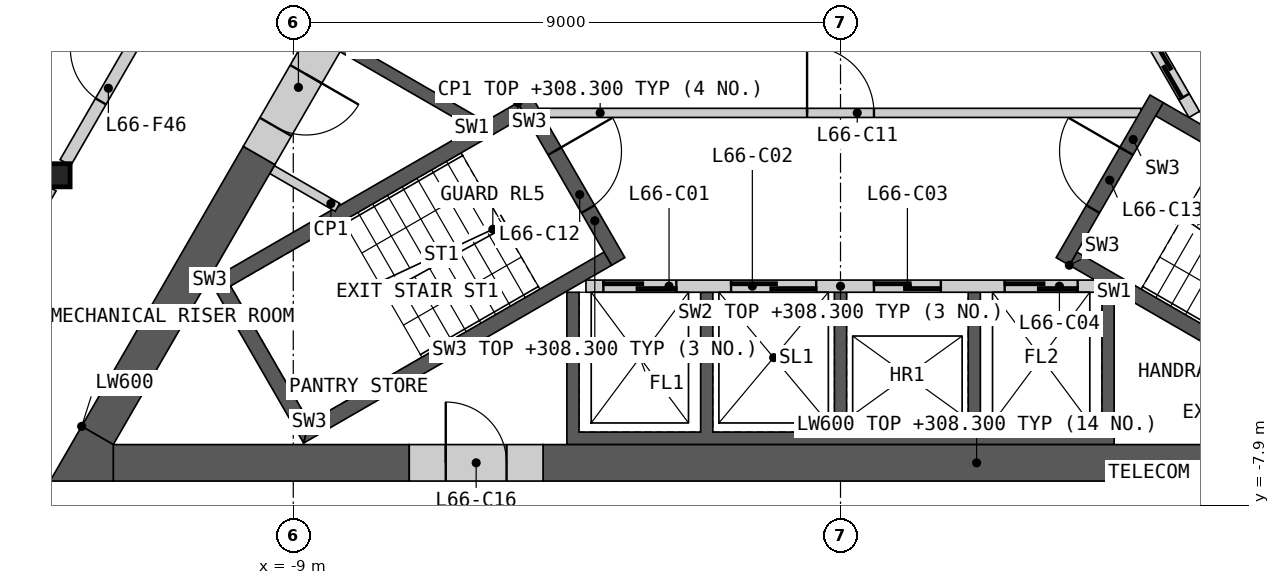
"""IFC4 building model, lengths in metres.
Left out: names, types, materials, properties, quantities, classifications, styles, units other than length and angle.
Written with IfcOpenShell. Run it as: python <this file> out.ifc"""

import sys

from ifc_helpers import new_model, si_unit, direction, frame, frame_2d, origin, origin_2d, place, context, subcontext, project, spatial, polyline, rectangle, i_section, outline, extrude, element, fill, save


model = new_model("IFC4")
c1 = context("Model", 3, precision=1e-05, world=origin(), true_north=direction((0.0, 1.0)))
c2 = subcontext(c1, "Body", "Model", "MODEL_VIEW")
j1 = project(units=[si_unit("LENGTHUNIT", "METRE"), si_unit("PLANEANGLEUNIT", "RADIAN")], contexts=[c1])
p1 = place(None, origin())
s1 = spatial("IfcSite", under=j1, at=p1, CompositionType="ELEMENT")
p2 = place(p1, origin())
s2 = spatial("IfcBuilding", under=s1, at=p2, CompositionType="ELEMENT")
p3 = place(p2, frame((0.0, 0.0, 305.2)))
s3 = spatial("IfcBuildingStorey", under=s2, at=p3, CompositionType="ELEMENT", Elevation=305.2)
p4 = place(p3, frame((-12.868, -2.476, 0.0), z_axis=(0.0, 0.0, 1.0), x_axis=(1.0, 0.0, 0.0)))
e1 = element("IfcColumn", 1, at=p4, inside=s3, PredefinedType="COLUMN", context=c2, shape_type="SweptSolid", body=[
    extrude(i_section(OverallWidth=0.396, OverallDepth=0.381, WebThickness=0.019, FlangeThickness=0.03, at=origin_2d()), origin(), (0.0, 0.0, 1.0), 3.4),
])
p5 = place(p3, origin())
e2 = element("IfcWall", 2, at=p5, inside=s3, PredefinedType="SHEAR", context=c2, shape_type="SweptSolid", body=[
    extrude(outline(polyline([(4.5, -4.4), (4.5, -6.906), (-4.5, -6.906), (-4.5, -4.4), (-4.3, -4.4), (-4.3, -6.7), (-2.3, -6.7), (-2.3, -4.4), (-2.1, -4.4), (-2.1, -6.7), (-0.1, -6.7), (-0.1, -4.4), (0.1, -4.4), (0.1, -6.7), (2.1, -6.7), (2.1, -4.4), (2.3, -4.4), (2.3, -6.7), (4.3, -6.7), (4.3, -4.4), (4.5, -4.4)])), origin(), (0.0, 0.0, 1.0), 3.1),
])
p6 = place(p3, frame((-4.187, -4.3, 0.0), z_axis=(0.0, 0.0, 1.0), x_axis=(1.0, 0.0, 0.0)))
e3 = element("IfcWall", 3, at=p6, inside=s3, PredefinedType="SOLIDWALL", context=c2, shape_type="SweptSolid", body=[
    extrude(rectangle(XDim=8.373, YDim=0.2, at=frame_2d((4.187, 0.0))), origin(), (0.0, 0.0, 1.0), 3.1),
])
p7 = place(p6, frame((0.287, 0.0, 0.0)))
e4 = element("IfcOpeningElement", 4, at=p7, cuts=e3, PredefinedType="OPENING", context=c2, shape_type="SweptSolid", body=[
    extrude(rectangle(XDim=1.2, YDim=2.1, at=frame_2d((0.6, 1.05))), frame((0.0, 0.11, 0.0), z_axis=(0.0, -1.0, 0.0), x_axis=(1.0, 0.0, 0.0)), (0.0, 0.0, 1.0), 0.22),
])
p8 = place(p6, frame((2.387, 0.0, 0.0)))
e5 = element("IfcOpeningElement", 5, at=p8, cuts=e3, PredefinedType="OPENING", context=c2, shape_type="SweptSolid", body=[
    extrude(rectangle(XDim=1.4, YDim=2.1, at=frame_2d((0.7, 1.05))), frame((0.0, 0.11, 0.0), z_axis=(0.0, -1.0, 0.0), x_axis=(1.0, 0.0, 0.0)), (0.0, 0.0, 1.0), 0.22),
])
p9 = place(p6, frame((4.737, 0.0, 0.0)))
e6 = element("IfcOpeningElement", 6, at=p9, cuts=e3, PredefinedType="OPENING", context=c2, shape_type="SweptSolid", body=[
    extrude(rectangle(XDim=1.1, YDim=2.1, at=frame_2d((0.55, 1.05))), frame((0.0, 0.11, 0.0), z_axis=(0.0, -1.0, 0.0), x_axis=(1.0, 0.0, 0.0)), (0.0, 0.0, 1.0), 0.22),
])
p10 = place(p6, frame((6.887, 0.0, 0.0)))
e7 = element("IfcOpeningElement", 7, at=p10, cuts=e3, PredefinedType="OPENING", context=c2, shape_type="SweptSolid", body=[
    extrude(rectangle(XDim=1.2, YDim=2.1, at=frame_2d((0.6, 1.05))), frame((0.0, 0.11, 0.0), z_axis=(0.0, -1.0, 0.0), x_axis=(1.0, 0.0, 0.0)), (0.0, 0.0, 1.0), 0.22),
])
p11 = place(p3, origin())
e8 = element("IfcWall", 8, at=p11, inside=s3, PredefinedType="SHEAR", context=c2, shape_type="SweptSolid", body=[
    extrude(outline(polyline([(1.561, 6.097), (3.731, 7.35), (8.231, -0.444), (6.061, -1.697), (5.96, -1.524), (7.952, -0.374), (6.952, 1.358), (4.96, 0.208), (4.861, 0.381), (6.852, 1.531), (5.852, 3.263), (3.861, 2.113), (3.76, 2.287), (5.752, 3.437), (4.752, 5.169), (2.76, 4.019), (2.66, 4.192), (4.652, 5.342), (3.652, 7.074), (1.66, 5.924), (1.561, 6.097)])), origin(), (0.0, 0.0, 1.0), 3.1),
])
p12 = place(p3, frame((5.817, -1.476, 0.0), z_axis=(0.0, 0.0, 1.0), x_axis=(-0.500002616675, 0.866023893041, 0.0)))
e9 = element("IfcWall", 9, at=p12, inside=s3, PredefinedType="SOLIDWALL", context=c2, shape_type="SweptSolid", body=[
    extrude(rectangle(XDim=8.373, YDim=0.2, at=frame_2d((4.187, 0.0))), origin(), (0.0, 0.0, 1.0), 3.1),
])
p13 = place(p12, frame((0.337, 0.0, 0.0)))
e10 = element("IfcOpeningElement", 10, at=p13, cuts=e9, PredefinedType="OPENING", context=c2, shape_type="SweptSolid", body=[
    extrude(rectangle(XDim=1.1, YDim=2.1, at=frame_2d((0.55, 1.05))), frame((0.0, 0.11, 0.0), z_axis=(0.0, -1.0, 0.0), x_axis=(1.0, 0.0, 0.0)), (0.0, 0.0, 1.0), 0.22),
])
p14 = place(p12, frame((2.537, 0.0, 0.0)))
e11 = element("IfcOpeningElement", 11, at=p14, cuts=e9, PredefinedType="OPENING", context=c2, shape_type="SweptSolid", body=[
    extrude(rectangle(XDim=1.1, YDim=2.1, at=frame_2d((0.55, 1.05))), frame((0.0, 0.11, 0.0), z_axis=(0.0, -1.0, 0.0), x_axis=(1.0, 0.0, 0.0)), (0.0, 0.0, 1.0), 0.22),
])
p15 = place(p12, frame((4.737, 0.0, 0.0)))
e12 = element("IfcOpeningElement", 12, at=p15, cuts=e9, PredefinedType="OPENING", context=c2, shape_type="SweptSolid", body=[
    extrude(rectangle(XDim=1.1, YDim=2.1, at=frame_2d((0.55, 1.05))), frame((0.0, 0.11, 0.0), z_axis=(0.0, -1.0, 0.0), x_axis=(1.0, 0.0, 0.0)), (0.0, 0.0, 1.0), 0.22),
])
p16 = place(p12, frame((7.037, 0.0, 0.0)))
e13 = element("IfcOpeningElement", 13, at=p16, cuts=e9, PredefinedType="OPENING", context=c2, shape_type="SweptSolid", body=[
    extrude(rectangle(XDim=0.9, YDim=2.1, at=frame_2d((0.45, 1.05))), frame((0.0, 0.11, 0.0), z_axis=(0.0, -1.0, 0.0), x_axis=(1.0, 0.0, 0.0)), (0.0, 0.0, 1.0), 0.22),
])
p17 = place(p3, origin())
e14 = element("IfcWall", 14, at=p17, inside=s3, PredefinedType="SHEAR", context=c2, shape_type="SweptSolid", body=[
    extrude(outline(polyline([(-6.061, -1.697), (-8.231, -0.444), (-8.131, -0.271), (-5.96, -1.524), (-6.061, -1.697)])), origin(), (0.0, 0.0, 1.0), 3.1),
])
p18 = place(p3, frame((-4.941, -1.45, 0.0), z_axis=(0.0, 0.0, 1.0), x_axis=(1.0, 0.0, 0.0)))
e15 = element("IfcWall", 15, at=p18, inside=s3, PredefinedType="PARTITIONING", context=c2, shape_type="SweptSolid", body=[
    extrude(rectangle(XDim=9.882, YDim=0.15, at=frame_2d((4.941, 0.0))), origin(), (0.0, 0.0, 1.0), 3.1),
])
p19 = place(p18, frame((4.391, 0.0, 0.0)))
e16 = element("IfcOpeningElement", 16, at=p19, cuts=e15, PredefinedType="OPENING", context=c2, shape_type="SweptSolid", body=[
    extrude(rectangle(XDim=1.1, YDim=2.1, at=frame_2d((0.55, 1.05))), frame((0.0, 0.085, 0.0), z_axis=(0.0, -1.0, 0.0), x_axis=(1.0, 0.0, 0.0)), (0.0, 0.0, 1.0), 0.17),
])
p20 = place(p3, origin())
e17 = element("IfcWall", 17, at=p20, inside=s3, PredefinedType="SHEAR", context=c2, shape_type="SweptSolid", body=[
    extrude(outline(polyline([(-5.307, -1.281), (-10.374, -4.206), (-10.032, -4.298), (-5.182, -1.498), (-5.307, -1.281)])), origin(), (0.0, 0.0, 1.0), 3.1),
])
p21 = place(p3, origin())
e18 = element("IfcWall", 18, at=p21, inside=s3, PredefinedType="SHEAR", context=c2, shape_type="SweptSolid", body=[
    extrude(outline(polyline([(-10.374, -4.206), (-8.83, -6.881), (-8.738, -6.539), (-10.032, -4.298), (-10.374, -4.206)])), origin(), (0.0, 0.0, 1.0), 3.1),
])
p22 = place(p3, origin())
e19 = element("IfcWall", 19, at=p22, inside=s3, PredefinedType="SHEAR", context=c2, shape_type="SweptSolid", body=[
    extrude(outline(polyline([(-8.738, -6.539), (-8.83, -6.881), (-3.763, -3.956), (-3.888, -3.739), (-8.738, -6.539)])), origin(), (0.0, 0.0, 1.0), 3.1),
])
p23 = place(p3, frame((-5.199, -1.219, 0.0), z_axis=(0.0, 0.0, 1.0), x_axis=(0.499982516597, -0.866035497597, 0.0)))
e20 = element("IfcWall", 20, at=p23, inside=s3, PredefinedType="SHEAR", context=c2, shape_type="SweptSolid", body=[
    extrude(rectangle(XDim=3.088, YDim=0.25, at=frame_2d((1.544, 0.0))), origin(), (0.0, 0.0, 1.0), 3.1),
])
p24 = place(p23, frame((0.994, 0.0, 0.0)))
e21 = element("IfcOpeningElement", 21, at=p24, cuts=e20, PredefinedType="OPENING", context=c2, shape_type="SweptSolid", body=[
    extrude(rectangle(XDim=1.1, YDim=2.1, at=frame_2d((0.55, 1.05))), frame((0.0, 0.135, 0.0), z_axis=(0.0, -1.0, 0.0), x_axis=(1.0, 0.0, 0.0)), (0.0, 0.0, 1.0), 0.27),
])
p25 = place(p3, origin())
e22 = element("IfcWall", 22, at=p25, inside=s3, PredefinedType="SHEAR", context=c2, shape_type="SweptSolid", body=[
    extrude(outline(polyline([(3.763, -3.956), (8.83, -6.881), (8.738, -6.539), (3.888, -3.739), (3.763, -3.956)])), origin(), (0.0, 0.0, 1.0), 3.1),
])
p26 = place(p3, origin())
e23 = element("IfcWall", 23, at=p26, inside=s3, PredefinedType="SHEAR", context=c2, shape_type="SweptSolid", body=[
    extrude(outline(polyline([(10.032, -4.298), (10.374, -4.206), (5.307, -1.281), (5.182, -1.498), (10.032, -4.298)])), origin(), (0.0, 0.0, 1.0), 3.1),
])
p27 = place(p3, frame((3.655, -3.893, 0.0), z_axis=(0.0, 0.0, 1.0), x_axis=(0.499982516597, 0.866035497597, 0.0)))
e24 = element("IfcWall", 24, at=p27, inside=s3, PredefinedType="SHEAR", context=c2, shape_type="SweptSolid", body=[
    extrude(rectangle(XDim=3.088, YDim=0.25, at=frame_2d((1.544, 0.0))), origin(), (0.0, 0.0, 1.0), 3.1),
])
p28 = place(p27, frame((0.994, 0.0, 0.0)))
e25 = element("IfcOpeningElement", 25, at=p28, cuts=e24, PredefinedType="OPENING", context=c2, shape_type="SweptSolid", body=[
    extrude(rectangle(XDim=1.1, YDim=2.1, at=frame_2d((0.55, 1.05))), frame((0.0, 0.135, 0.0), z_axis=(0.0, -1.0, 0.0), x_axis=(1.0, 0.0, 0.0)), (0.0, 0.0, 1.0), 0.27),
])
p29 = place(p3, frame((-9.35, -2.383, 0.0), z_axis=(0.0, 0.0, 1.0), x_axis=(0.866057962423, -0.499943602543, 0.0)))
e26 = element("IfcWall", 26, at=p29, inside=s3, PredefinedType="PARTITIONING", context=c2, shape_type="SweptSolid", body=[
    extrude(rectangle(XDim=1.242, YDim=0.15, at=frame_2d((0.621, 0.0))), origin(), (0.0, 0.0, 1.0), 3.1),
])
p30 = place(p3, frame((-4.892, -7.206, 0.0), z_axis=(0.0, 0.0, 1.0), x_axis=(1.0, 0.0, 0.0)))
e27 = element("IfcWall", 27, at=p30, inside=s3, PredefinedType="SHEAR", context=c2, shape_type="SweptSolid", body=[
    extrude(rectangle(XDim=14.261, YDim=0.6, at=frame_2d((7.13, 0.0))), origin(), (0.0, 0.0, 1.0), 3.1),
])
p31 = place(p3, frame((-11.961, -7.206, 0.0), z_axis=(0.0, 0.0, 1.0), x_axis=(1.0, 0.0, 0.0)))
e28 = element("IfcWall", 28, at=p31, inside=s3, PredefinedType="SHEAR", context=c2, shape_type="SweptSolid", body=[
    extrude(rectangle(XDim=4.868, YDim=0.6, at=frame_2d((2.434, 0.0))), origin(), (0.0, 0.0, 1.0), 3.1),
])
p32 = place(p3, frame((8.841, -0.902, 0.0), z_axis=(0.0, 0.0, 1.0), x_axis=(-0.499995618375, 0.866027933502, 0.0)))
e29 = element("IfcWall", 29, at=p32, inside=s3, PredefinedType="SHEAR", context=c2, shape_type="SweptSolid", body=[
    extrude(rectangle(XDim=14.571, YDim=0.6, at=frame_2d((7.285, 0.0))), origin(), (0.0, 0.0, 1.0), 3.1),
])
p33 = place(p3, frame((-9.562, -2.15, 0.0), z_axis=(0.0, 0.0, 1.0), x_axis=(-0.500015214976, -0.866016619236, 0.0)))
e30 = element("IfcWall", 30, at=p33, inside=s3, PredefinedType="SHEAR", context=c2, shape_type="SweptSolid", body=[
    extrude(rectangle(XDim=5.318, YDim=0.6, at=frame_2d((2.659, 0.0))), origin(), (0.0, 0.0, 1.0), 3.1),
])
p34 = place(p3, origin())
e31 = element("IfcWall", 31, at=p34, inside=s3, PredefinedType="SHEAR", context=c2, shape_type="SweptSolid", body=[
    extrude(outline(polyline([(-12.48, -6.606), (-11.961, -6.906), (-11.961, -7.506), (-13.0, -7.506), (-12.48, -6.606)])), origin(), (0.0, 0.0, 1.0), 3.1),
])
p35 = place(p3, frame((-7.092, -7.206, 0.0), z_axis=(0.0, 0.0, 1.0), x_axis=(1.0, 0.0, 0.0)))
e32 = element("IfcWall", 32, at=p35, inside=s3, PredefinedType="SHEAR", context=c2, shape_type="SweptSolid", body=[
    extrude(rectangle(XDim=2.2, YDim=0.6, at=frame_2d((1.1, 0.0))), origin(), (0.0, 0.0, 1.0), 3.1),
])
p36 = place(p35, frame((0.6, 0.0, 0.0)))
e33 = element("IfcOpeningElement", 33, at=p36, cuts=e32, PredefinedType="OPENING", context=c2, shape_type="SweptSolid", body=[
    extrude(rectangle(XDim=1.0, YDim=2.1, at=frame_2d((0.5, 1.05))), frame((0.0, 0.31, 0.0), z_axis=(0.0, -1.0, 0.0), x_axis=(1.0, 0.0, 0.0)), (0.0, 0.0, 1.0), 0.62),
])
p37 = place(p3, frame((-8.44, -0.208, 0.0), z_axis=(0.0, 0.0, 1.0), x_axis=(-0.500001951578, -0.866024277037, 0.0)))
e34 = element("IfcWall", 34, at=p37, inside=s3, PredefinedType="SHEAR", context=c2, shape_type="SweptSolid", body=[
    extrude(rectangle(XDim=2.243, YDim=0.6, at=frame_2d((1.122, 0.0))), origin(), (0.0, 0.0, 1.0), 3.1),
])
p38 = place(p37, frame((0.7, 0.0, 0.0)))
e35 = element("IfcOpeningElement", 35, at=p38, cuts=e34, PredefinedType="OPENING", context=c2, shape_type="SweptSolid", body=[
    extrude(rectangle(XDim=1.0, YDim=2.1, at=frame_2d((0.5, 1.05))), frame((0.0, 0.31, 0.0), z_axis=(0.0, -1.0, 0.0), x_axis=(1.0, 0.0, 0.0)), (0.0, 0.0, 1.0), 0.62),
])
p39 = place(p3, frame((-12.748, -2.269, 0.0), z_axis=(0.0, 0.0, 1.0), x_axis=(0.499984266882, 0.866034487114, 0.0)))
e36 = element("IfcWall", 36, at=p39, inside=s3, PredefinedType="PARTITIONING", context=c2, shape_type="SweptSolid", body=[
    extrude(rectangle(XDim=8.099, YDim=0.2, at=frame_2d((4.049, 0.0))), origin(), (0.0, 0.0, 1.0), 3.1),
])
p40 = place(p39, frame((1.164, 0.0, 0.0)))
e37 = element("IfcOpeningElement", 37, at=p40, cuts=e36, PredefinedType="OPENING", context=c2, shape_type="SweptSolid", body=[
    extrude(rectangle(XDim=1.0, YDim=2.1, at=frame_2d((0.5, 1.05))), frame((0.0, 0.11, 0.0), z_axis=(0.0, -1.0, 0.0), x_axis=(1.0, 0.0, 0.0)), (0.0, 0.0, 1.0), 0.22),
])
p41 = place(p3, frame((-15.131, -6.397, 0.0), z_axis=(0.0, 0.0, 1.0), x_axis=(0.500003406062, 0.866023437285, 0.0)))
e38 = element("IfcWall", 38, at=p41, inside=s3, PredefinedType="PARTITIONING", context=c2, shape_type="SweptSolid", body=[
    extrude(rectangle(XDim=4.288, YDim=0.2, at=frame_2d((2.144, 0.0))), origin(), (0.0, 0.0, 1.0), 3.1),
])
p42 = place(p7, origin())
e39 = element("IfcDoor", 39, at=p42, inside=s3, OperationType="SLIDING_TO_LEFT", PredefinedType="DOOR", context=c2, shape_type="SweptSolid", body=[
    extrude(rectangle(XDim=1.2, YDim=2.1, at=frame_2d((0.6, 1.05))), frame((0.0, 0.025, 0.0), z_axis=(0.0, -1.0, 0.0), x_axis=(1.0, 0.0, 0.0)), (0.0, 0.0, 1.0), 0.05),
])
fill(e4, e39)
p43 = place(p8, origin())
e40 = element("IfcDoor", 40, at=p43, inside=s3, OperationType="SLIDING_TO_LEFT", PredefinedType="DOOR", context=c2, shape_type="SweptSolid", body=[
    extrude(rectangle(XDim=1.4, YDim=2.1, at=frame_2d((0.7, 1.05))), frame((0.0, 0.025, 0.0), z_axis=(0.0, -1.0, 0.0), x_axis=(1.0, 0.0, 0.0)), (0.0, 0.0, 1.0), 0.05),
])
fill(e5, e40)
p44 = place(p9, origin())
e41 = element("IfcDoor", 41, at=p44, inside=s3, OperationType="SLIDING_TO_LEFT", PredefinedType="DOOR", context=c2, shape_type="SweptSolid", body=[
    extrude(rectangle(XDim=1.1, YDim=2.1, at=frame_2d((0.55, 1.05))), frame((0.0, 0.025, 0.0), z_axis=(0.0, -1.0, 0.0), x_axis=(1.0, 0.0, 0.0)), (0.0, 0.0, 1.0), 0.05),
])
fill(e6, e41)
p45 = place(p10, origin())
e42 = element("IfcDoor", 42, at=p45, inside=s3, OperationType="SLIDING_TO_LEFT", PredefinedType="DOOR", context=c2, shape_type="SweptSolid", body=[
    extrude(rectangle(XDim=1.2, YDim=2.1, at=frame_2d((0.6, 1.05))), frame((0.0, 0.025, 0.0), z_axis=(0.0, -1.0, 0.0), x_axis=(1.0, 0.0, 0.0)), (0.0, 0.0, 1.0), 0.05),
])
fill(e7, e42)
p46 = place(p13, origin())
e43 = element("IfcDoor", 43, at=p46, inside=s3, OperationType="SLIDING_TO_LEFT", PredefinedType="DOOR", context=c2, shape_type="SweptSolid", body=[
    extrude(rectangle(XDim=1.1, YDim=2.1, at=frame_2d((0.55, 1.05))), frame((0.0, 0.025, 0.0), z_axis=(0.0, -1.0, 0.0), x_axis=(1.0, 0.0, 0.0)), (0.0, 0.0, 1.0), 0.05),
])
fill(e10, e43)
p47 = place(p19, origin())
e44 = element("IfcDoor", 44, at=p47, inside=s3, OperationType="SINGLE_SWING_LEFT", PredefinedType="DOOR", context=c2, shape_type="SweptSolid", body=[
    extrude(rectangle(XDim=1.1, YDim=2.1, at=frame_2d((0.55, 1.05))), frame((0.0, 0.025, 0.0), z_axis=(0.0, -1.0, 0.0), x_axis=(1.0, 0.0, 0.0)), (0.0, 0.0, 1.0), 0.05),
])
fill(e16, e44)
p48 = place(p24, origin())
e45 = element("IfcDoor", 45, at=p48, inside=s3, OperationType="SINGLE_SWING_LEFT", PredefinedType="DOOR", context=c2, shape_type="SweptSolid", body=[
    extrude(rectangle(XDim=1.1, YDim=2.1, at=frame_2d((0.55, 1.05))), frame((0.0, 0.025, 0.0), z_axis=(0.0, -1.0, 0.0), x_axis=(1.0, 0.0, 0.0)), (0.0, 0.0, 1.0), 0.05),
])
fill(e21, e45)
p49 = place(p28, origin())
e46 = element("IfcDoor", 46, at=p49, inside=s3, OperationType="SINGLE_SWING_RIGHT", PredefinedType="DOOR", context=c2, shape_type="SweptSolid", body=[
    extrude(rectangle(XDim=1.1, YDim=2.1, at=frame_2d((0.55, 1.05))), frame((0.0, 0.025, 0.0), z_axis=(0.0, -1.0, 0.0), x_axis=(1.0, 0.0, 0.0)), (0.0, 0.0, 1.0), 0.05),
])
fill(e25, e46)
p50 = place(p36, origin())
e47 = element("IfcDoor", 47, at=p50, inside=s3, OperationType="SINGLE_SWING_LEFT", PredefinedType="DOOR", context=c2, shape_type="SweptSolid", body=[
    extrude(rectangle(XDim=1.0, YDim=2.1, at=frame_2d((0.5, 1.05))), frame((0.0, 0.055, 0.0), z_axis=(0.0, -1.0, 0.0), x_axis=(1.0, 0.0, 0.0)), (0.0, 0.0, 1.0), 0.05),
])
fill(e33, e47)
p51 = place(p38, origin())
e48 = element("IfcDoor", 48, at=p51, inside=s3, OperationType="SINGLE_SWING_LEFT", PredefinedType="DOOR", context=c2, shape_type="SweptSolid", body=[
    extrude(rectangle(XDim=1.0, YDim=2.1, at=frame_2d((0.5, 1.05))), frame((0.0, 0.055, 0.0), z_axis=(0.0, -1.0, 0.0), x_axis=(1.0, 0.0, 0.0)), (0.0, 0.0, 1.0), 0.05),
])
fill(e35, e48)
p52 = place(p40, origin())
e49 = element("IfcDoor", 49, at=p52, inside=s3, OperationType="SINGLE_SWING_RIGHT", PredefinedType="DOOR", context=c2, shape_type="SweptSolid", body=[
    extrude(rectangle(XDim=1.0, YDim=2.1, at=frame_2d((0.5, 1.05))), frame((0.0, 0.025, 0.0), z_axis=(0.0, -1.0, 0.0), x_axis=(1.0, 0.0, 0.0)), (0.0, 0.0, 1.0), 0.05),
])
fill(e37, e49)
save(model, sys.argv[1])
